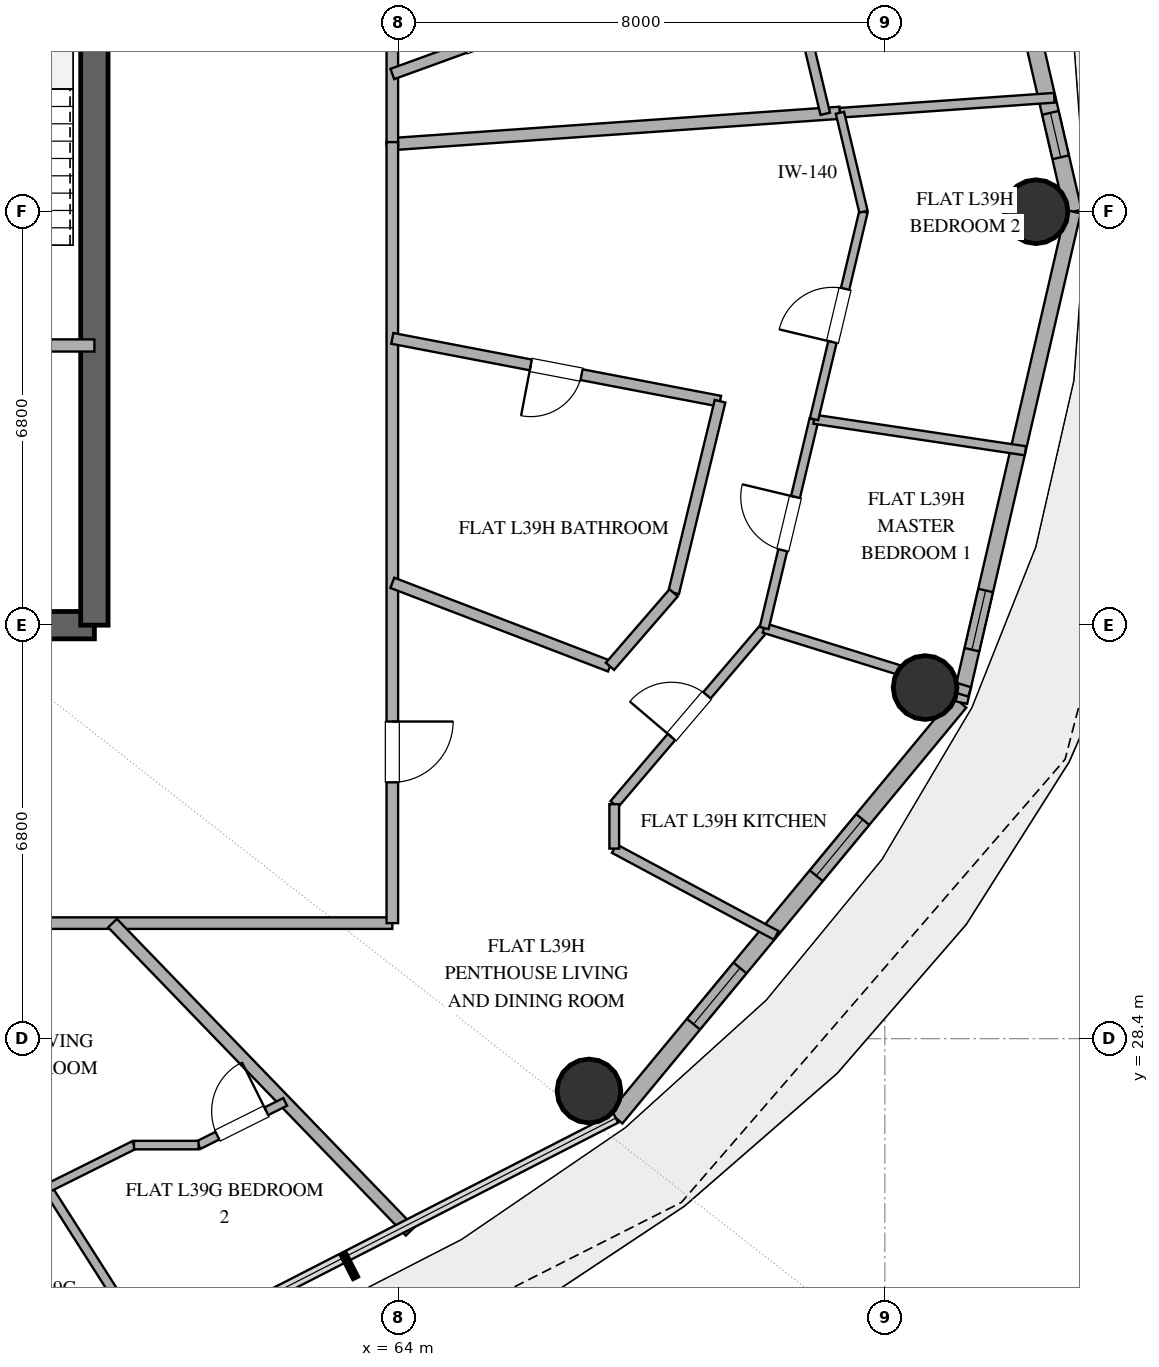
"""IFC4 building model, lengths in metres.
Left out: names, types, materials, properties, quantities, classifications, styles, units other than length and angle.
Written with IfcOpenShell. Run it as: python <this file> out.ifc"""

import sys

from ifc_helpers import new_model, si_unit, direction, frame, frame_2d, origin, origin_2d, place, context, subcontext, project, spatial, rectangle, hollow_circle, extrude, element, fill, save


model = new_model("IFC4")
c1 = context("Model", 3, precision=1e-05, world=origin(), true_north=direction((0.0, 1.0)))
c2 = subcontext(c1, "Body", "Model", "MODEL_VIEW")
j1 = project(units=[si_unit("LENGTHUNIT", "METRE"), si_unit("PLANEANGLEUNIT", "RADIAN")], contexts=[c1])
p1 = place(None, origin())
s1 = spatial("IfcSite", under=j1, at=p1, CompositionType="ELEMENT")
p2 = place(p1, origin())
s2 = spatial("IfcBuilding", under=s1, at=p2, CompositionType="ELEMENT")
p3 = place(p2, frame((0.0, 0.0, 157.8)))
s3 = spatial("IfcBuildingStorey", under=s2, at=p3, CompositionType="ELEMENT", Elevation=157.8)
p4 = place(p3, frame((55.0, 35.2, 0.0), z_axis=(0.0, 0.0, 1.0), x_axis=(1.0, 0.0, 0.0)))
e1 = element("IfcWall", 1, at=p4, inside=s3, PredefinedType="SHEAR", context=c2, shape_type="SweptSolid", body=[
    extrude(rectangle(XDim=4.0, YDim=0.45, at=frame_2d((2.0, 0.0))), origin(), (0.0, 0.0, 1.0), 3.38),
])
p5 = place(p4, frame((1.4, 0.0, 0.0)))
e2 = element("IfcOpeningElement", 2, at=p5, cuts=e1, PredefinedType="OPENING", context=c2, shape_type="SweptSolid", body=[
    extrude(rectangle(XDim=1.2, YDim=2.15, at=frame_2d((0.6, 1.075))), frame((0.0, 0.235, 0.0), z_axis=(0.0, -1.0, 0.0), x_axis=(1.0, 0.0, 0.0)), (0.0, 0.0, 1.0), 0.47),
])
p6 = place(p3, frame((59.0, 35.2, 0.0), z_axis=(0.0, 0.0, 1.0), x_axis=(0.0, 1.0, 0.0)))
e3 = element("IfcWall", 3, at=p6, inside=s3, PredefinedType="SHEAR", context=c2, shape_type="SweptSolid", body=[
    extrude(rectangle(XDim=13.6, YDim=0.45, at=frame_2d((6.8, 0.0))), origin(), (0.0, 0.0, 1.0), 3.38),
])
for number, where, z_axis, x_axis in (
    (4, (74.487, 42.0, 0.0), (0.0, 0.0, 1.0), (1.0, 0.0, 0.0)),
    (5, (67.134, 27.54, 0.0), (0.0, 0.0, 1.0), (1.0, 0.0, 0.0)),
    (6, (72.662, 34.174, 0.0), (0.0, 0.0, 1.0), (1.0, 0.0, 0.0)),
):
    element("IfcColumn", number, at=place(p3, frame(where, z_axis=z_axis, x_axis=x_axis)), inside=s3, PredefinedType="COLUMN", context=c2, shape_type="SweptSolid", body=[
        extrude(hollow_circle(Radius=0.525, WallThickness=0.028, at=origin_2d()), origin(), (0.0, 0.0, 1.0), 3.38),
    ])
p7 = place(p3, frame((75.099, 42.0, 0.0), z_axis=(0.0, 0.0, 1.0), x_axis=(-0.225473184558, 0.974249374157, 0.0)))
e7 = element("IfcWall", 7, at=p7, inside=s3, PredefinedType="SOLIDWALL", context=c2, shape_type="SweptSolid", body=[
    extrude(rectangle(XDim=8.28, YDim=0.28, at=frame_2d((4.14, 0.0))), origin(), (0.0, 0.0, 1.0), 3.38),
])
p8 = place(p7, frame((5.694, 0.0, 0.0)))
e8 = element("IfcOpeningElement", 8, at=p8, cuts=e7, PredefinedType="OPENING", context=c2, shape_type="SweptSolid", body=[
    extrude(rectangle(XDim=1.05, YDim=2.2, at=frame_2d((0.525, 1.1))), frame((0.0, 0.15, 0.0), z_axis=(0.0, -1.0, 0.0), x_axis=(1.0, 0.0, 0.0)), (0.0, 0.0, 1.0), 0.3),
])
p9 = place(p7, frame((0.918, 0.0, 0.85)))
e9 = element("IfcOpeningElement", 9, at=p9, cuts=e7, PredefinedType="OPENING", context=c2, shape_type="SweptSolid", body=[
    extrude(rectangle(XDim=0.75, YDim=1.8, at=frame_2d((0.375, 0.9))), frame((0.0, 0.15, 0.0), z_axis=(0.0, -1.0, 0.0), x_axis=(1.0, 0.0, 0.0)), (0.0, 0.0, 1.0), 0.3),
])
p10 = place(p3, frame((67.576, 27.094, 0.0), z_axis=(0.0, 0.0, 1.0), x_axis=(0.637333477683, 0.770588111915, 0.0)))
e10 = element("IfcWall", 10, at=p10, inside=s3, PredefinedType="SOLIDWALL", context=c2, shape_type="SweptSolid", body=[
    extrude(rectangle(XDim=8.875, YDim=0.28, at=frame_2d((4.438, 0.0))), origin(), (0.0, 0.0, 1.0), 3.38),
])
p11 = place(p10, frame((2.004, 0.0, 0.85)))
e11 = element("IfcOpeningElement", 11, at=p11, cuts=e10, PredefinedType="OPENING", context=c2, shape_type="SweptSolid", body=[
    extrude(rectangle(XDim=1.2, YDim=1.8, at=frame_2d((0.6, 0.9))), frame((0.0, 0.15, 0.0), z_axis=(0.0, -1.0, 0.0), x_axis=(1.0, 0.0, 0.0)), (0.0, 0.0, 1.0), 0.3),
])
p12 = place(p10, frame((5.172, 0.0, 0.85)))
e12 = element("IfcOpeningElement", 12, at=p12, cuts=e10, PredefinedType="OPENING", context=c2, shape_type="SweptSolid", body=[
    extrude(rectangle(XDim=1.2, YDim=1.6, at=frame_2d((0.6, 0.8))), frame((0.0, 0.15, 0.0), z_axis=(0.0, -1.0, 0.0), x_axis=(1.0, 0.0, 0.0)), (0.0, 0.0, 1.0), 0.3),
])
p13 = place(p3, frame((73.232, 33.933, 0.0), z_axis=(0.0, 0.0, 1.0), x_axis=(0.225473184558, 0.974249374157, 0.0)))
e13 = element("IfcWall", 13, at=p13, inside=s3, PredefinedType="SOLIDWALL", context=c2, shape_type="SweptSolid", body=[
    extrude(rectangle(XDim=8.28, YDim=0.25, at=frame_2d((4.14, 0.0))), origin(), (0.0, 0.0, 1.0), 3.38),
])
p14 = place(p13, frame((0.886, 0.0, 0.35)))
e14 = element("IfcOpeningElement", 14, at=p14, cuts=e13, PredefinedType="OPENING", context=c2, shape_type="SweptSolid", body=[
    extrude(rectangle(XDim=1.0, YDim=1.05, at=frame_2d((0.5, 0.525))), frame((0.0, 0.135, 0.0), z_axis=(0.0, -1.0, 0.0), x_axis=(1.0, 0.0, 0.0)), (0.0, 0.0, 1.0), 0.27),
])
p15 = place(p3, frame((55.0, 39.8, 0.0), z_axis=(0.0, 0.0, 1.0), x_axis=(1.0, 0.0, 0.0)))
e15 = element("IfcWall", 15, at=p15, inside=s3, PredefinedType="SOLIDWALL", context=c2, shape_type="SweptSolid", body=[
    extrude(rectangle(XDim=4.0, YDim=0.2, at=frame_2d((2.0, 0.0))), origin(), (0.0, 0.0, 1.0), 2.74),
])
p16 = place(p15, frame((1.45, 0.0, 0.0)))
e16 = element("IfcOpeningElement", 16, at=p16, cuts=e15, PredefinedType="OPENING", context=c2, shape_type="SweptSolid", body=[
    extrude(rectangle(XDim=1.1, YDim=2.15, at=frame_2d((0.55, 1.075))), frame((0.0, 0.11, 0.0), z_axis=(0.0, -1.0, 0.0), x_axis=(1.0, 0.0, 0.0)), (0.0, 0.0, 1.0), 0.22),
])
p17 = place(p3, frame((48.891, 30.3, 0.0), z_axis=(0.0, 0.0, 1.0), x_axis=(1.0, 0.0, 0.0)))
e17 = element("IfcWall", 17, at=p17, inside=s3, PredefinedType="PARTITIONING", context=c2, shape_type="SweptSolid", body=[
    extrude(rectangle(XDim=15.009, YDim=0.19, at=frame_2d((7.504, 0.0))), origin(), (0.0, 0.0, 1.0), 2.74),
])
p18 = place(p17, frame((4.704, 0.0, 0.0)))
e18 = element("IfcOpeningElement", 18, at=p18, cuts=e17, PredefinedType="OPENING", context=c2, shape_type="SweptSolid", body=[
    extrude(rectangle(XDim=1.0, YDim=2.2, at=frame_2d((0.5, 1.1))), frame((0.0, 0.105, 0.0), z_axis=(0.0, -1.0, 0.0), x_axis=(1.0, 0.0, 0.0)), (0.0, 0.0, 1.0), 0.21),
])
p19 = place(p3, frame((71.261, 43.627, 0.0), z_axis=(0.0, 0.0, 1.0), x_axis=(-0.997562906323, -0.069772830877, 0.0)))
e19 = element("IfcWall", 19, at=p19, inside=s3, PredefinedType="PARTITIONING", context=c2, shape_type="SweptSolid", body=[
    extrude(rectangle(XDim=7.38, YDim=0.2, at=frame_2d((3.69, 0.0))), origin(), (0.0, 0.0, 1.0), 2.74),
])
p20 = place(p3, frame((63.9, 53.7, 0.0), z_axis=(0.0, 0.0, 1.0), x_axis=(0.0, -1.0, 0.0)))
e20 = element("IfcWall", 20, at=p20, inside=s3, PredefinedType="PARTITIONING", context=c2, shape_type="SweptSolid", body=[
    extrude(rectangle(XDim=10.62, YDim=0.19, at=frame_2d((5.31, 0.0))), origin(), (0.0, 0.0, 1.0), 2.74),
])
p21 = place(p20, frame((2.48, 0.0, 0.0)))
e21 = element("IfcOpeningElement", 21, at=p21, cuts=e20, PredefinedType="OPENING", context=c2, shape_type="SweptSolid", body=[
    extrude(rectangle(XDim=1.0, YDim=2.2, at=frame_2d((0.5, 1.1))), frame((0.0, 0.105, 0.0), z_axis=(0.0, -1.0, 0.0), x_axis=(1.0, 0.0, 0.0)), (0.0, 0.0, 1.0), 0.21),
])
p22 = place(p3, frame((63.9, 43.144, 0.0), z_axis=(0.0, 0.0, 1.0), x_axis=(0.0, -1.0, 0.0)))
e22 = element("IfcWall", 22, at=p22, inside=s3, PredefinedType="PARTITIONING", context=c2, shape_type="SweptSolid", body=[
    extrude(rectangle(XDim=12.844, YDim=0.19, at=frame_2d((6.422, 0.0))), origin(), (0.0, 0.0, 1.0), 2.74),
])
p23 = place(p22, frame((9.529, 0.0, 0.0)))
e23 = element("IfcOpeningElement", 23, at=p23, cuts=e22, PredefinedType="OPENING", context=c2, shape_type="SweptSolid", body=[
    extrude(rectangle(XDim=1.0, YDim=2.2, at=frame_2d((0.5, 1.1))), frame((0.0, 0.105, 0.0), z_axis=(0.0, -1.0, 0.0), x_axis=(1.0, 0.0, 0.0)), (0.0, 0.0, 1.0), 0.21),
])
p24 = place(p3, frame((69.29, 38.883, 0.0), z_axis=(0.0, 0.0, 1.0), x_axis=(-0.98210182834, 0.188350733396, 0.0)))
e24 = element("IfcWall", 24, at=p24, inside=s3, PredefinedType="PLUMBINGWALL", context=c2, shape_type="SweptSolid", body=[
    extrude(rectangle(XDim=5.488, YDim=0.18, at=frame_2d((2.744, 0.0))), origin(), (0.0, 0.0, 1.0), 2.74),
])
p25 = place(p24, frame((2.319, 0.0, 0.0)))
e25 = element("IfcOpeningElement", 25, at=p25, cuts=e24, PredefinedType="OPENING", context=c2, shape_type="SweptSolid", body=[
    extrude(rectangle(XDim=0.85, YDim=2.1, at=frame_2d((0.425, 1.05))), frame((0.0, 0.1, 0.0), z_axis=(0.0, -1.0, 0.0), x_axis=(1.0, 0.0, 0.0)), (0.0, 0.0, 1.0), 0.2),
])
p26 = place(p3, frame((69.793, 48.728, 0.0), z_axis=(0.0, 0.0, 1.0), x_axis=(0.23310450522, -0.972451690135, 0.0)))
e26 = element("IfcWall", 26, at=p26, inside=s3, PredefinedType="PLUMBINGWALL", context=c2, shape_type="SweptSolid", body=[
    extrude(rectangle(XDim=5.263, YDim=0.16, at=frame_2d((2.631, 0.0))), origin(), (0.0, 0.0, 1.0), 2.74),
])
p27 = place(p26, frame((2.181, 0.0, 0.0)))
e27 = element("IfcOpeningElement", 27, at=p27, cuts=e26, PredefinedType="OPENING", context=c2, shape_type="SweptSolid", body=[
    extrude(rectangle(XDim=0.9, YDim=2.1, at=frame_2d((0.45, 1.05))), frame((0.0, 0.09, 0.0), z_axis=(0.0, -1.0, 0.0), x_axis=(1.0, 0.0, 0.0)), (0.0, 0.0, 1.0), 0.18),
])
p28 = place(p3, frame((59.299, 30.3, 0.0), z_axis=(0.0, 0.0, 1.0), x_axis=(0.694647685064, -0.719350118952, 0.0)))
e28 = element("IfcWall", 28, at=p28, inside=s3, PredefinedType="PARTITIONING", context=c2, shape_type="SweptSolid", body=[
    extrude(rectangle(XDim=7.047, YDim=0.2, at=frame_2d((3.523, 0.0))), origin(), (0.0, 0.0, 1.0), 2.74),
])
p29 = place(p3, frame((63.9, 35.896, 0.0), z_axis=(0.0, 0.0, 1.0), x_axis=(0.933598121494, -0.3583218491, 0.0)))
e29 = element("IfcWall", 29, at=p29, inside=s3, PredefinedType="PLUMBINGWALL", context=c2, shape_type="SweptSolid", body=[
    extrude(rectangle(XDim=3.834, YDim=0.18, at=frame_2d((1.917, 0.0))), origin(), (0.0, 0.0, 1.0), 2.74),
])
p30 = place(p3, frame((67.55, 32.256, 0.0), z_axis=(0.0, 0.0, 1.0), x_axis=(0.648060027494, 0.76158925988, 0.0)))
e30 = element("IfcWall", 30, at=p30, inside=s3, PredefinedType="PLUMBINGWALL", context=c2, shape_type="SweptSolid", body=[
    extrude(rectangle(XDim=3.804, YDim=0.16, at=frame_2d((1.902, 0.0))), origin(), (0.0, 0.0, 1.0), 2.74),
])
p31 = place(p30, frame((1.452, 0.0, 0.0)))
e31 = element("IfcOpeningElement", 31, at=p31, cuts=e30, PredefinedType="OPENING", context=c2, shape_type="SweptSolid", body=[
    extrude(rectangle(XDim=0.9, YDim=2.1, at=frame_2d((0.45, 1.05))), frame((0.0, 0.09, 0.0), z_axis=(0.0, -1.0, 0.0), x_axis=(1.0, 0.0, 0.0)), (0.0, 0.0, 1.0), 0.18),
])
p32 = place(p3, frame((70.015, 35.153, 0.0), z_axis=(0.0, 0.0, 1.0), x_axis=(0.954891562425, -0.296954717101, 0.0)))
e32 = element("IfcWall", 32, at=p32, inside=s3, PredefinedType="PLUMBINGWALL", context=c2, shape_type="SweptSolid", body=[
    extrude(rectangle(XDim=3.539, YDim=0.16, at=frame_2d((1.769, 0.0))), origin(), (0.0, 0.0, 1.0), 2.74),
])
p33 = place(p3, frame((71.261, 43.627, 0.0), z_axis=(0.0, 0.0, 1.0), x_axis=(0.997563824095, 0.069759707979, 0.0)))
e33 = element("IfcWall", 33, at=p33, inside=s3, PredefinedType="PLUMBINGWALL", context=c2, shape_type="SweptSolid", body=[
    extrude(rectangle(XDim=3.535, YDim=0.16, at=frame_2d((1.767, 0.0))), origin(), (0.0, 0.0, 1.0), 2.74),
])
p34 = place(p3, frame((70.015, 35.153, 0.0), z_axis=(0.0, 0.0, 1.0), x_axis=(0.232452361323, 0.972607783084, 0.0)))
e34 = element("IfcWall", 34, at=p34, inside=s3, PredefinedType="PARTITIONING", context=c2, shape_type="SweptSolid", body=[
    extrude(rectangle(XDim=3.531, YDim=0.15, at=frame_2d((1.766, 0.0))), origin(), (0.0, 0.0, 1.0), 2.74),
])
p35 = place(p34, frame((1.315, 0.0, 0.0)))
e35 = element("IfcOpeningElement", 35, at=p35, cuts=e34, PredefinedType="OPENING", context=c2, shape_type="SweptSolid", body=[
    extrude(rectangle(XDim=0.9, YDim=2.1, at=frame_2d((0.45, 1.05))), frame((0.0, 0.085, 0.0), z_axis=(0.0, -1.0, 0.0), x_axis=(1.0, 0.0, 0.0)), (0.0, 0.0, 1.0), 0.17),
])
p36 = place(p3, frame((74.312, 38.068, 0.0), z_axis=(0.0, 0.0, 1.0), x_axis=(-0.989013160958, 0.147827492205, 0.0)))
e36 = element("IfcWall", 36, at=p36, inside=s3, PredefinedType="PARTITIONING", context=c2, shape_type="SweptSolid", body=[
    extrude(rectangle(XDim=3.514, YDim=0.15, at=frame_2d((1.757, 0.0))), origin(), (0.0, 0.0, 1.0), 2.74),
])
p37 = place(p3, frame((70.836, 38.587, 0.0), z_axis=(0.0, 0.0, 1.0), x_axis=(0.231598574747, 0.972811441223, 0.0)))
e37 = element("IfcWall", 37, at=p37, inside=s3, PredefinedType="PARTITIONING", context=c2, shape_type="SweptSolid", body=[
    extrude(rectangle(XDim=3.508, YDim=0.14, at=frame_2d((1.754, 0.0))), origin(), (0.0, 0.0, 1.0), 2.74),
])
p38 = place(p37, frame((1.304, 0.0, 0.0)))
e38 = element("IfcOpeningElement", 38, at=p38, cuts=e37, PredefinedType="OPENING", context=c2, shape_type="SweptSolid", body=[
    extrude(rectangle(XDim=0.9, YDim=2.1, at=frame_2d((0.45, 1.05))), frame((0.0, 0.08, 0.0), z_axis=(0.0, -1.0, 0.0), x_axis=(1.0, 0.0, 0.0)), (0.0, 0.0, 1.0), 0.16),
])
p39 = place(p3, frame((63.9, 44.264, 0.0), z_axis=(0.0, 0.0, 1.0), x_axis=(0.939936319397, 0.341349843238, 0.0)))
e39 = element("IfcWall", 39, at=p39, inside=s3, PredefinedType="PLUMBINGWALL", context=c2, shape_type="SweptSolid", body=[
    extrude(rectangle(XDim=3.39, YDim=0.18, at=frame_2d((1.695, 0.0))), origin(), (0.0, 0.0, 1.0), 2.74),
])
p40 = place(p39, frame((1.27, 0.0, 0.0)))
e40 = element("IfcOpeningElement", 40, at=p40, cuts=e39, PredefinedType="OPENING", context=c2, shape_type="SweptSolid", body=[
    extrude(rectangle(XDim=0.85, YDim=2.1, at=frame_2d((0.425, 1.05))), frame((0.0, 0.1, 0.0), z_axis=(0.0, -1.0, 0.0), x_axis=(1.0, 0.0, 0.0)), (0.0, 0.0, 1.0), 0.2),
])
p41 = place(p3, frame((60.042, 23.097, 0.0), z_axis=(0.0, 0.0, 1.0), x_axis=(-0.537325063909, 0.843375228291, 0.0)))
e41 = element("IfcWall", 41, at=p41, inside=s3, PredefinedType="PARTITIONING", context=c2, shape_type="SweptSolid", body=[
    extrude(rectangle(XDim=3.373, YDim=0.15, at=frame_2d((1.687, 0.0))), origin(), (0.0, 0.0, 1.0), 2.74),
])
p42 = place(p3, frame((68.526, 35.732, 0.0), z_axis=(0.0, 0.0, 1.0), x_axis=(0.235531062042, 0.971866821541, 0.0)))
e42 = element("IfcWall", 42, at=p42, inside=s3, PredefinedType="PLUMBINGWALL", context=c2, shape_type="SweptSolid", body=[
    extrude(rectangle(XDim=3.242, YDim=0.18, at=frame_2d((1.621, 0.0))), origin(), (0.0, 0.0, 1.0), 2.74),
])
p43 = place(p3, frame((70.214, 30.099, 0.0), z_axis=(0.0, 0.0, 1.0), x_axis=(-0.881434325569, 0.472306605616, 0.0)))
e43 = element("IfcWall", 43, at=p43, inside=s3, PredefinedType="PLUMBINGWALL", context=c2, shape_type="SweptSolid", body=[
    extrude(rectangle(XDim=3.022, YDim=0.16, at=frame_2d((1.511, 0.0))), origin(), (0.0, 0.0, 1.0), 2.74),
])
p44 = place(p3, frame((71.649, 42.0, 0.0), z_axis=(0.0, 0.0, 1.0), x_axis=(-0.231561310927, 0.972820311919, 0.0)))
e44 = element("IfcWall", 44, at=p44, inside=s3, PredefinedType="PARTITIONING", context=c2, shape_type="SweptSolid", body=[
    extrude(rectangle(XDim=1.672, YDim=0.14, at=frame_2d((0.836, 0.0))), origin(), (0.0, 0.0, 1.0), 2.74),
])
p45 = place(p3, frame((67.479, 34.523, 0.0), z_axis=(0.0, 0.0, 1.0), x_axis=(0.654605010187, 0.755971084525, 0.0)))
e45 = element("IfcWall", 45, at=p45, inside=s3, PredefinedType="PLUMBINGWALL", context=c2, shape_type="SweptSolid", body=[
    extrude(rectangle(XDim=1.599, YDim=0.18, at=frame_2d((0.8, 0.0))), origin(), (0.0, 0.0, 1.0), 2.74),
])
p46 = place(p3, frame((60.713, 26.65, 0.0), z_axis=(0.0, 0.0, 1.0), x_axis=(0.894917522296, 0.446231585937, 0.0)))
e46 = element("IfcWall", 46, at=p46, inside=s3, PredefinedType="PARTITIONING", context=c2, shape_type="SweptSolid", body=[
    extrude(rectangle(XDim=1.592, YDim=0.14, at=frame_2d((0.796, 0.0))), origin(), (0.0, 0.0, 1.0), 2.74),
])
p47 = place(p46, frame((0.346, 0.0, 0.0)))
e47 = element("IfcOpeningElement", 47, at=p47, cuts=e46, PredefinedType="OPENING", context=c2, shape_type="SweptSolid", body=[
    extrude(rectangle(XDim=0.9, YDim=2.1, at=frame_2d((0.45, 1.05))), frame((0.0, 0.08, 0.0), z_axis=(0.0, -1.0, 0.0), x_axis=(1.0, 0.0, 0.0)), (0.0, 0.0, 1.0), 0.16),
])
p48 = place(p3, frame((58.23, 25.942, 0.0), z_axis=(0.0, 0.0, 1.0), x_axis=(0.895072075717, 0.445921494516, 0.0)))
e48 = element("IfcWall", 48, at=p48, inside=s3, PredefinedType="PARTITIONING", context=c2, shape_type="SweptSolid", body=[
    extrude(rectangle(XDim=1.588, YDim=0.14, at=frame_2d((0.794, 0.0))), origin(), (0.0, 0.0, 1.0), 2.74),
])
p49 = place(p3, frame((59.651, 26.65, 0.0), z_axis=(0.0, 0.0, 1.0), x_axis=(1.0, 0.0, 0.0)))
e49 = element("IfcWall", 49, at=p49, inside=s3, PredefinedType="PARTITIONING", context=c2, shape_type="SweptSolid", body=[
    extrude(rectangle(XDim=1.062, YDim=0.14, at=frame_2d((0.531, 0.0))), origin(), (0.0, 0.0, 1.0), 2.74),
])
p50 = place(p3, frame((67.55, 31.526, 0.0), z_axis=(0.0, 0.0, 1.0), x_axis=(0.0, 1.0, 0.0)))
e50 = element("IfcWall", 50, at=p50, inside=s3, PredefinedType="PLUMBINGWALL", context=c2, shape_type="SweptSolid", body=[
    extrude(rectangle(XDim=0.73, YDim=0.16, at=frame_2d((0.365, 0.0))), origin(), (0.0, 0.0, 1.0), 2.74),
])
p51 = place(p11, origin())
e51 = element("IfcWindow", 51, at=p51, inside=s3, PartitioningType="SINGLE_PANEL", PredefinedType="WINDOW", context=c2, shape_type="SweptSolid", body=[
    extrude(rectangle(XDim=1.2, YDim=1.8, at=frame_2d((0.6, 0.9))), frame((0.0, 0.03, 0.0), z_axis=(0.0, -1.0, 0.0), x_axis=(1.0, 0.0, 0.0)), (0.0, 0.0, 1.0), 0.06),
])
fill(e11, e51)
p52 = place(p12, origin())
e52 = element("IfcWindow", 52, at=p52, inside=s3, PartitioningType="SINGLE_PANEL", PredefinedType="WINDOW", context=c2, shape_type="SweptSolid", body=[
    extrude(rectangle(XDim=1.2, YDim=1.6, at=frame_2d((0.6, 0.8))), frame((0.0, 0.03, 0.0), z_axis=(0.0, -1.0, 0.0), x_axis=(1.0, 0.0, 0.0)), (0.0, 0.0, 1.0), 0.06),
])
fill(e12, e52)
p53 = place(p14, origin())
e53 = element("IfcWindow", 53, at=p53, inside=s3, PartitioningType="SINGLE_PANEL", PredefinedType="WINDOW", context=c2, shape_type="SweptSolid", body=[
    extrude(rectangle(XDim=1.0, YDim=1.05, at=frame_2d((0.5, 0.525))), frame((0.0, 0.03, 0.0), z_axis=(0.0, -1.0, 0.0), x_axis=(1.0, 0.0, 0.0)), (0.0, 0.0, 1.0), 0.06),
])
fill(e14, e53)
p54 = place(p9, origin())
e54 = element("IfcWindow", 54, at=p54, inside=s3, PartitioningType="SINGLE_PANEL", PredefinedType="WINDOW", context=c2, shape_type="SweptSolid", body=[
    extrude(rectangle(XDim=0.75, YDim=1.8, at=frame_2d((0.375, 0.9))), frame((0.0, 0.03, 0.0), z_axis=(0.0, -1.0, 0.0), x_axis=(1.0, 0.0, 0.0)), (0.0, 0.0, 1.0), 0.06),
])
fill(e9, e54)
p55 = place(p23, origin())
e55 = element("IfcDoor", 55, at=p55, inside=s3, OperationType="SINGLE_SWING_LEFT", PredefinedType="DOOR", context=c2, shape_type="SweptSolid", body=[
    extrude(rectangle(XDim=1.0, YDim=2.2, at=frame_2d((0.5, 1.1))), frame((0.0, 0.025, 0.0), z_axis=(0.0, -1.0, 0.0), x_axis=(1.0, 0.0, 0.0)), (0.0, 0.0, 1.0), 0.05),
])
fill(e23, e55)
p56 = place(p25, origin())
e56 = element("IfcDoor", 56, at=p56, inside=s3, OperationType="SINGLE_SWING_RIGHT", PredefinedType="DOOR", context=c2, shape_type="SweptSolid", body=[
    extrude(rectangle(XDim=0.85, YDim=2.1, at=frame_2d((0.425, 1.05))), frame((0.0, 0.025, 0.0), z_axis=(0.0, -1.0, 0.0), x_axis=(1.0, 0.0, 0.0)), (0.0, 0.0, 1.0), 0.05),
])
fill(e25, e56)
p57 = place(p31, origin())
e57 = element("IfcDoor", 57, at=p57, inside=s3, OperationType="SINGLE_SWING_LEFT", PredefinedType="DOOR", context=c2, shape_type="SweptSolid", body=[
    extrude(rectangle(XDim=0.9, YDim=2.1, at=frame_2d((0.45, 1.05))), frame((0.0, 0.025, 0.0), z_axis=(0.0, -1.0, 0.0), x_axis=(1.0, 0.0, 0.0)), (0.0, 0.0, 1.0), 0.05),
])
fill(e31, e57)
p58 = place(p35, origin())
e58 = element("IfcDoor", 58, at=p58, inside=s3, OperationType="SINGLE_SWING_RIGHT", PredefinedType="DOOR", context=c2, shape_type="SweptSolid", body=[
    extrude(rectangle(XDim=0.9, YDim=2.1, at=frame_2d((0.45, 1.05))), frame((0.0, 0.025, 0.0), z_axis=(0.0, -1.0, 0.0), x_axis=(1.0, 0.0, 0.0)), (0.0, 0.0, 1.0), 0.05),
])
fill(e35, e58)
p59 = place(p38, origin())
e59 = element("IfcDoor", 59, at=p59, inside=s3, OperationType="SINGLE_SWING_LEFT", PredefinedType="DOOR", context=c2, shape_type="SweptSolid", body=[
    extrude(rectangle(XDim=0.9, YDim=2.1, at=frame_2d((0.45, 1.05))), frame((0.0, 0.025, 0.0), z_axis=(0.0, -1.0, 0.0), x_axis=(1.0, 0.0, 0.0)), (0.0, 0.0, 1.0), 0.05),
])
fill(e38, e59)
p60 = place(p47, origin())
e60 = element("IfcDoor", 60, at=p60, inside=s3, OperationType="SINGLE_SWING_RIGHT", PredefinedType="DOOR", context=c2, shape_type="SweptSolid", body=[
    extrude(rectangle(XDim=0.9, YDim=2.1, at=frame_2d((0.45, 1.05))), frame((0.0, 0.025, 0.0), z_axis=(0.0, -1.0, 0.0), x_axis=(1.0, 0.0, 0.0)), (0.0, 0.0, 1.0), 0.05),
])
fill(e47, e60)
save(model, sys.argv[1])
